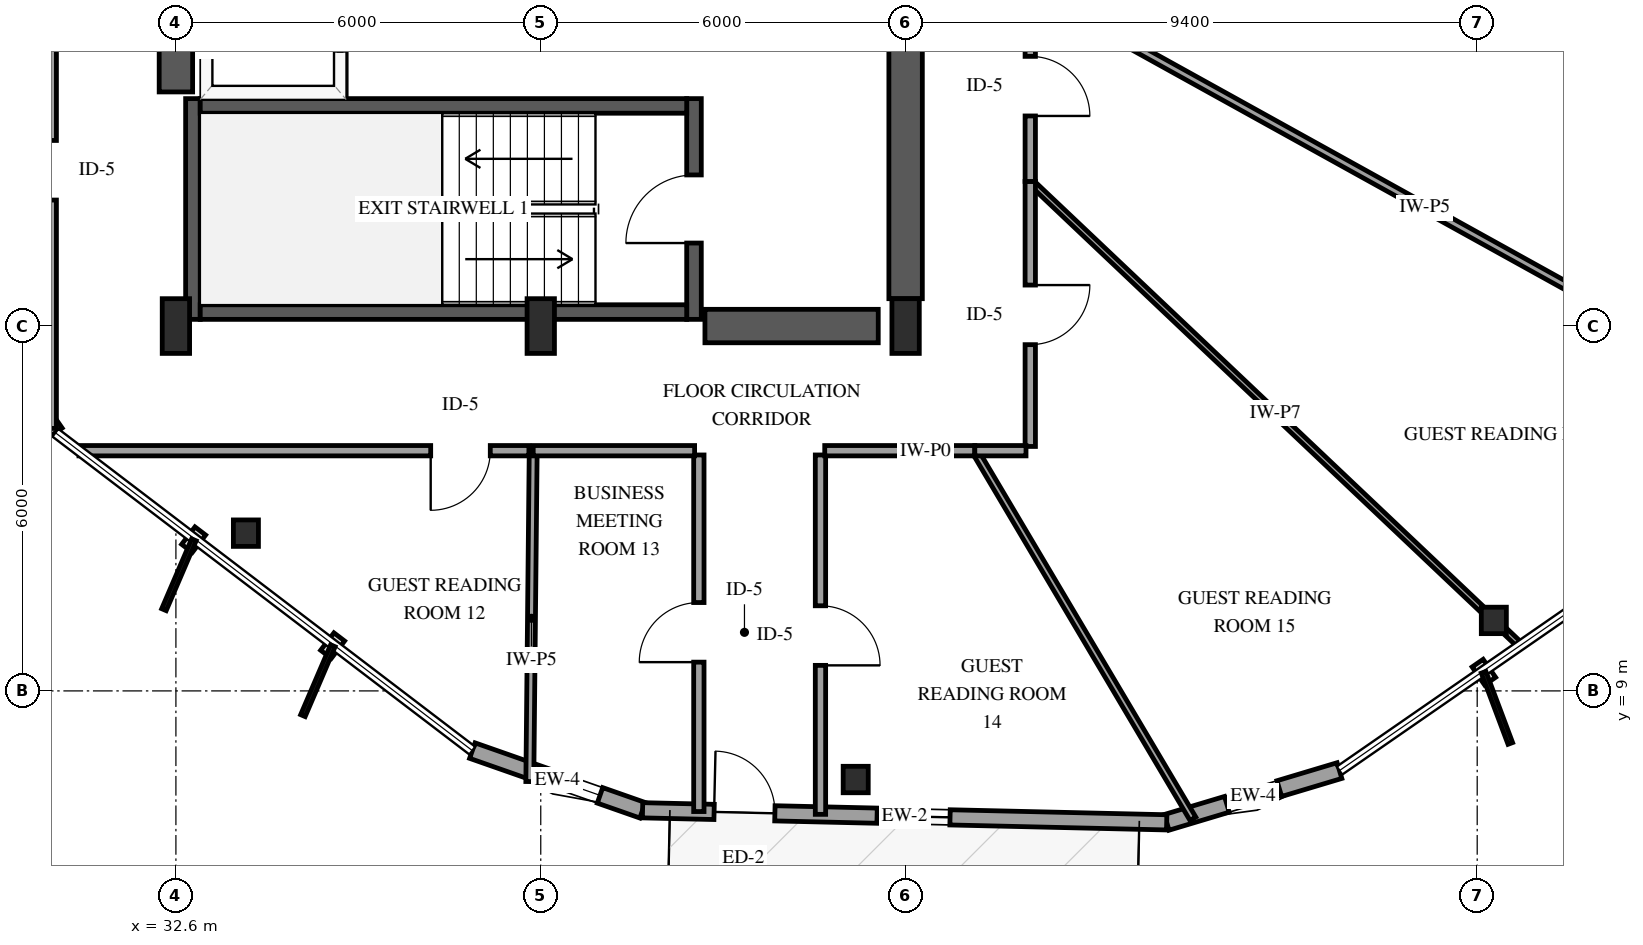
"""IFC4 building model, lengths in metres.
Left out: names, types, materials, properties, quantities, classifications, styles, units other than length and angle.
Written with IfcOpenShell. Run it as: python <this file> out.ifc"""

import sys

from ifc_helpers import new_model, si_unit, direction, frame, frame_2d, origin, origin_2d, place, context, subcontext, project, spatial, rectangle, i_section, extrude, element, fill, save


model = new_model("IFC4")
c1 = context("Model", 3, precision=1e-05, world=origin(), true_north=direction((0.0, 1.0)))
c2 = subcontext(c1, "Body", "Model", "MODEL_VIEW")
j1 = project(units=[si_unit("LENGTHUNIT", "METRE"), si_unit("PLANEANGLEUNIT", "RADIAN")], contexts=[c1])
p1 = place(None, origin())
s1 = spatial("IfcSite", under=j1, at=p1, CompositionType="ELEMENT")
p2 = place(p1, origin())
s2 = spatial("IfcBuilding", under=s1, at=p2, CompositionType="ELEMENT")
p3 = place(p2, frame((0.0, 0.0, 160.6)))
s3 = spatial("IfcBuildingStorey", under=s2, at=p3, CompositionType="ELEMENT", Elevation=160.6)
p4 = place(p3, frame((32.88, 15.11, 0.0), z_axis=(0.0, 0.0, 1.0), x_axis=(0.0, 1.0, 0.0)))
e1 = element("IfcWall", 1, at=p4, inside=s3, PredefinedType="SHEAR", context=c2, shape_type="SweptSolid", body=[
    extrude(rectangle(XDim=3.63, YDim=0.24, at=frame_2d((1.815, 0.0))), origin(), (0.0, 0.0, 1.0), 3.6),
])
p5 = place(p3, frame((41.12, 15.11, 0.0), z_axis=(0.0, 0.0, 1.0), x_axis=(0.0, 1.0, 0.0)))
e2 = element("IfcWall", 2, at=p5, inside=s3, PredefinedType="SHEAR", context=c2, shape_type="SweptSolid", body=[
    extrude(rectangle(XDim=3.63, YDim=0.24, at=frame_2d((1.815, 0.0))), origin(), (0.0, 0.0, 1.0), 3.6),
])
p6 = place(p5, frame((1.255, 0.0, 0.0)))
e3 = element("IfcOpeningElement", 3, at=p6, cuts=e2, PredefinedType="OPENING", context=c2, shape_type="SweptSolid", body=[
    extrude(rectangle(XDim=1.12, YDim=2.15, at=frame_2d((0.56, 1.075))), frame((0.0, 0.13, 0.0), z_axis=(0.0, -1.0, 0.0), x_axis=(1.0, 0.0, 0.0)), (0.0, 0.0, 1.0), 0.26),
])
for number, where, z_axis, x_axis in (
    (4, (33.0, 15.23, 0.0), (0.0, 0.0, 1.0), (1.0, 0.0, 0.0)),
    (5, (33.0, 18.62, 0.0), (0.0, 0.0, 1.0), (1.0, 0.0, 0.0)),
):
    element("IfcWall", number, at=place(p3, frame(where, z_axis=z_axis, x_axis=x_axis)), inside=s3, PredefinedType="SHEAR", context=c2, shape_type="SweptSolid", body=[
        extrude(rectangle(XDim=8.0, YDim=0.24, at=frame_2d((4.0, 0.0))), origin(), (0.0, 0.0, 1.0), 3.6),
    ])
p7 = place(p3, frame((32.6, 18.85, 0.0), z_axis=(0.0, 0.0, 1.0), x_axis=(0.0, 1.0, 0.0)))
e6 = element("IfcWall", 6, at=p7, inside=s3, PredefinedType="SHEAR", context=c2, shape_type="SweptSolid", body=[
    extrude(rectangle(XDim=12.3, YDim=0.55, at=frame_2d((6.15, 0.0))), origin(), (0.0, 0.0, 1.0), 3.6),
])
p8 = place(p3, frame((41.3, 15.0, 0.0), z_axis=(0.0, 0.0, 1.0), x_axis=(1.0, 0.0, 0.0)))
e7 = element("IfcWall", 7, at=p8, inside=s3, PredefinedType="SHEAR", context=c2, shape_type="SweptSolid", body=[
    extrude(rectangle(XDim=2.85, YDim=0.55, at=frame_2d((1.425, 0.0))), origin(), (0.0, 0.0, 1.0), 3.6),
])
p9 = place(p3, frame((44.6, 15.45, 0.0), z_axis=(0.0, 0.0, 1.0), x_axis=(0.0, 1.0, 0.0)))
e8 = element("IfcWall", 8, at=p9, inside=s3, PredefinedType="SHEAR", context=c2, shape_type="SweptSolid", body=[
    extrude(rectangle(XDim=6.35, YDim=0.55, at=frame_2d((3.175, 0.0))), origin(), (0.0, 0.0, 1.0), 3.6),
])
for number, where, z_axis, x_axis in (
    (9, (32.6, 15.0, 0.0), (0.0, 0.0, 1.0), (1.0, 0.0, 0.0)),
    (10, (38.6, 15.0, 0.0), (0.0, 0.0, 1.0), (1.0, 0.0, 0.0)),
    (11, (44.6, 15.0, 0.0), (0.0, 0.0, 1.0), (1.0, 0.0, 0.0)),
):
    element("IfcColumn", number, at=place(p3, frame(where, z_axis=z_axis, x_axis=x_axis)), inside=s3, PredefinedType="PILASTER", context=c2, shape_type="SweptSolid", body=[
        extrude(rectangle(XDim=0.45, YDim=0.9, at=origin_2d()), origin(), (0.0, 0.0, 1.0), 3.6),
    ])
for number, where, z_axis, x_axis in (
    (12, (33.751, 11.594, 0.0), (0.0, 0.0, 1.0), (1.0, 0.0, 0.0)),
    (13, (43.779, 7.542, 0.0), (0.0, 0.0, 1.0), (1.0, 0.0, 0.0)),
    (14, (54.274, 10.159, 0.0), (0.0, 0.0, 1.0), (1.0, 0.0, 0.0)),
):
    element("IfcColumn", number, at=place(p3, frame(where, z_axis=z_axis, x_axis=x_axis)), inside=s3, PredefinedType="COLUMN", context=c2, shape_type="SweptSolid", body=[
        extrude(i_section(OverallWidth=0.412, OverallDepth=0.435, WebThickness=0.036, FlangeThickness=0.057, FilletRadius=0.038, at=origin_2d()), origin(), (0.0, 0.0, 1.0), 3.6),
    ])
p10 = place(p3, frame((28.93, 15.685, 0.0), z_axis=(0.0, 0.0, 1.0), x_axis=(0.569013104062, -0.822328454698, 0.0)))
e15 = element("IfcWall", 15, at=p10, inside=s3, PredefinedType="SOLIDWALL", context=c2, shape_type="SweptSolid", body=[
    extrude(rectangle(XDim=2.967, YDim=0.27, at=frame_2d((1.483, 0.0))), origin(), (0.0, 0.0, 1.0), 2.679),
])
p11 = place(p3, frame((37.475, 8.018, 0.0), z_axis=(0.0, 0.0, 1.0), x_axis=(0.94371585025, -0.330757303755, 0.0)))
e16 = element("IfcWall", 16, at=p11, inside=s3, PredefinedType="SOLIDWALL", context=c2, shape_type="SweptSolid", body=[
    extrude(rectangle(XDim=2.967, YDim=0.27, at=frame_2d((1.483, 0.0))), origin(), (0.0, 0.0, 1.0), 2.679),
])
p12 = place(p11, frame((1.325, 0.0, 0.75)))
e17 = element("IfcOpeningElement", 17, at=p12, cuts=e16, PredefinedType="OPENING", context=c2, shape_type="SweptSolid", body=[
    extrude(rectangle(XDim=0.9, YDim=1.5, at=frame_2d((0.45, 0.75))), frame((0.0, 0.145, 0.0), z_axis=(0.0, -1.0, 0.0), x_axis=(1.0, 0.0, 0.0)), (0.0, 0.0, 1.0), 0.29),
])
p13 = place(p3, frame((48.893, 6.838, 0.0), z_axis=(0.0, 0.0, 1.0), x_axis=(0.957939463861, 0.286970353134, 0.0)))
e18 = element("IfcWall", 18, at=p13, inside=s3, PredefinedType="SOLIDWALL", context=c2, shape_type="SweptSolid", body=[
    extrude(rectangle(XDim=2.967, YDim=0.27, at=frame_2d((1.483, 0.0))), origin(), (0.0, 0.0, 1.0), 2.679),
])
p14 = place(p13, frame((1.033, 0.0, 0.75)))
e19 = element("IfcOpeningElement", 19, at=p14, cuts=e18, PredefinedType="OPENING", context=c2, shape_type="SweptSolid", body=[
    extrude(rectangle(XDim=0.9, YDim=1.5, at=frame_2d((0.45, 0.75))), frame((0.0, 0.145, 0.0), z_axis=(0.0, -1.0, 0.0), x_axis=(1.0, 0.0, 0.0)), (0.0, 0.0, 1.0), 0.29),
])
p15 = place(p3, frame((40.274, 7.037, 0.0), z_axis=(0.0, 0.0, 1.0), x_axis=(0.999734296137, -0.023050751106, 0.0)))
e20 = element("IfcWall", 20, at=p15, inside=s3, PredefinedType="SOLIDWALL", context=c2, shape_type="SweptSolid", body=[
    extrude(rectangle(XDim=8.621, YDim=0.25, at=frame_2d((4.311, 0.0))), origin(), (0.0, 0.0, 1.0), 2.679),
])
p16 = place(p15, frame((1.177, 0.0, 0.0)))
e21 = element("IfcOpeningElement", 21, at=p16, cuts=e20, PredefinedType="OPENING", context=c2, shape_type="SweptSolid", body=[
    extrude(rectangle(XDim=1.0, YDim=2.15, at=frame_2d((0.5, 1.075))), frame((0.0, 0.135, 0.0), z_axis=(0.0, -1.0, 0.0), x_axis=(1.0, 0.0, 0.0)), (0.0, 0.0, 1.0), 0.27),
])
p17 = place(p15, frame((3.858, 0.0, 0.72)))
e22 = element("IfcOpeningElement", 22, at=p17, cuts=e20, PredefinedType="OPENING", context=c2, shape_type="SweptSolid", body=[
    extrude(rectangle(XDim=1.2, YDim=1.6, at=frame_2d((0.6, 0.8))), frame((0.0, 0.135, 0.0), z_axis=(0.0, -1.0, 0.0), x_axis=(1.0, 0.0, 0.0)), (0.0, 0.0, 1.0), 0.27),
])
p18 = place(p3, frame((35.3, 18.79, 0.0), z_axis=(0.0, 0.0, 1.0), x_axis=(0.0, 1.0, 0.0)))
e23 = element("IfcWall", 23, at=p18, inside=s3, PredefinedType="SOLIDWALL", context=c2, shape_type="SweptSolid", body=[
    extrude(rectangle(XDim=2.55, YDim=0.2, at=frame_2d((1.275, 0.0))), origin(), (0.0, 0.0, 1.0), 3.3),
])
p19 = place(p18, frame((0.725, 0.0, 0.0)))
e24 = element("IfcOpeningElement", 24, at=p19, cuts=e23, PredefinedType="OPENING", context=c2, shape_type="SweptSolid", body=[
    extrude(rectangle(XDim=1.1, YDim=2.15, at=frame_2d((0.55, 1.075))), frame((0.0, 0.11, 0.0), z_axis=(0.0, -1.0, 0.0), x_axis=(1.0, 0.0, 0.0)), (0.0, 0.0, 1.0), 0.22),
])
p20 = place(p3, frame((46.65, 22.668, 0.0), z_axis=(0.0, 0.0, 1.0), x_axis=(0.960491510773, -0.278309284308, 0.0)))
e25 = element("IfcWall", 25, at=p20, inside=s3, PredefinedType="PARTITIONING", context=c2, shape_type="SweptSolid", body=[
    extrude(rectangle(XDim=15.763, YDim=0.1, at=frame_2d((7.881, 0.0))), origin(), (0.0, 0.0, 1.0), 3.3),
])
p21 = place(p3, frame((46.65, 20.542, 0.0), z_axis=(0.0, 0.0, 1.0), x_axis=(0.874793288303, -0.484496339244, 0.0)))
e26 = element("IfcWall", 26, at=p21, inside=s3, PredefinedType="PARTITIONING", context=c2, shape_type="SweptSolid", body=[
    extrude(rectangle(XDim=14.83, YDim=0.13, at=frame_2d((7.415, 0.0))), origin(), (0.0, 0.0, 1.0), 3.3),
])
p22 = place(p3, frame((46.65, 17.378, 0.0), z_axis=(0.0, 0.0, 1.0), x_axis=(0.726135317292, -0.687551816943, 0.0)))
e27 = element("IfcWall", 27, at=p22, inside=s3, PredefinedType="PARTITIONING", context=c2, shape_type="SweptSolid", body=[
    extrude(rectangle(XDim=11.099, YDim=0.1, at=frame_2d((5.549, 0.0))), origin(), (0.0, 0.0, 1.0), 2.595),
])
p23 = place(p3, frame((30.55, 13.317, 0.0), z_axis=(0.0, 0.0, 1.0), x_axis=(0.0, 1.0, 0.0)))
e28 = element("IfcWall", 28, at=p23, inside=s3, PredefinedType="PARTITIONING", context=c2, shape_type="SweptSolid", body=[
    extrude(rectangle(XDim=8.461, YDim=0.17, at=frame_2d((4.23, 0.0))), origin(), (0.0, 0.0, 1.0), 3.3),
])
p24 = place(p23, frame((3.755, 0.0, 0.0)))
e29 = element("IfcOpeningElement", 29, at=p24, cuts=e28, PredefinedType="OPENING", context=c2, shape_type="SweptSolid", body=[
    extrude(rectangle(XDim=0.98, YDim=2.15, at=frame_2d((0.49, 1.075))), frame((0.0, 0.095, 0.0), z_axis=(0.0, -1.0, 0.0), x_axis=(1.0, 0.0, 0.0)), (0.0, 0.0, 1.0), 0.19),
])
p25 = place(p3, frame((38.405, 12.95, 0.0), z_axis=(0.0, 0.0, 1.0), x_axis=(-1.0, 0.0, 0.0)))
e30 = element("IfcWall", 30, at=p25, inside=s3, PredefinedType="PARTITIONING", context=c2, shape_type="SweptSolid", body=[
    extrude(rectangle(XDim=7.399, YDim=0.17, at=frame_2d((3.699, 0.0))), origin(), (0.0, 0.0, 1.0), 3.3),
])
p26 = place(p25, frame((0.635, 0.0, 0.0)))
e31 = element("IfcOpeningElement", 31, at=p26, cuts=e30, PredefinedType="OPENING", context=c2, shape_type="SweptSolid", body=[
    extrude(rectangle(XDim=0.98, YDim=2.15, at=frame_2d((0.49, 1.075))), frame((0.0, 0.095, 0.0), z_axis=(0.0, -1.0, 0.0), x_axis=(1.0, 0.0, 0.0)), (0.0, 0.0, 1.0), 0.19),
])
p27 = place(p3, frame((45.738, 12.95, 0.0), z_axis=(0.0, 0.0, 1.0), x_axis=(0.50979858573, -0.860293788184, 0.0)))
e32 = element("IfcWall", 32, at=p27, inside=s3, PredefinedType="PARTITIONING", context=c2, shape_type="SweptSolid", body=[
    extrude(rectangle(XDim=7.036, YDim=0.11, at=frame_2d((3.518, 0.0))), origin(), (0.0, 0.0, 1.0), 2.678),
])
p28 = place(p3, frame((43.2, 12.88, 0.0), z_axis=(0.0, 0.0, 1.0), x_axis=(0.0, -1.0, 0.0)))
e33 = element("IfcWall", 33, at=p28, inside=s3, PredefinedType="PARTITIONING", context=c2, shape_type="SweptSolid", body=[
    extrude(rectangle(XDim=5.91, YDim=0.17, at=frame_2d((2.955, 0.0))), origin(), (0.0, 0.0, 1.0), 2.595),
])
p29 = place(p28, frame((2.48, 0.0, 0.0)))
e34 = element("IfcOpeningElement", 34, at=p29, cuts=e33, PredefinedType="OPENING", context=c2, shape_type="SweptSolid", body=[
    extrude(rectangle(XDim=0.98, YDim=2.15, at=frame_2d((0.49, 1.075))), frame((0.0, 0.095, 0.0), z_axis=(0.0, -1.0, 0.0), x_axis=(1.0, 0.0, 0.0)), (0.0, 0.0, 1.0), 0.19),
])
p30 = place(p3, frame((41.2, 7.016, 0.0), z_axis=(0.0, 0.0, 1.0), x_axis=(0.0, 1.0, 0.0)))
e35 = element("IfcWall", 35, at=p30, inside=s3, PredefinedType="PARTITIONING", context=c2, shape_type="SweptSolid", body=[
    extrude(rectangle(XDim=5.864, YDim=0.17, at=frame_2d((2.932, 0.0))), origin(), (0.0, 0.0, 1.0), 3.3),
])
p31 = place(p30, frame((2.457, 0.0, 0.0)))
e36 = element("IfcOpeningElement", 36, at=p31, cuts=e35, PredefinedType="OPENING", context=c2, shape_type="SweptSolid", body=[
    extrude(rectangle(XDim=0.98, YDim=2.15, at=frame_2d((0.49, 1.075))), frame((0.0, 0.095, 0.0), z_axis=(0.0, -1.0, 0.0), x_axis=(1.0, 0.0, 0.0)), (0.0, 0.0, 1.0), 0.19),
])
p32 = place(p3, frame((38.475, 12.879, 0.0), z_axis=(0.0, 0.0, 1.0), x_axis=(-0.010274520152, -0.999947215725, 0.0)))
e37 = element("IfcWall", 37, at=p32, inside=s3, PredefinedType="PARTITIONING", context=c2, shape_type="SweptSolid", body=[
    extrude(rectangle(XDim=5.37, YDim=0.13, at=frame_2d((2.685, 0.0))), origin(), (0.0, 0.0, 1.0), 2.678),
])
p33 = place(p3, frame((46.65, 17.378, 0.0), z_axis=(0.0, 0.0, 1.0), x_axis=(0.0, -1.0, 0.0)))
e38 = element("IfcWall", 38, at=p33, inside=s3, PredefinedType="PARTITIONING", context=c2, shape_type="SweptSolid", body=[
    extrude(rectangle(XDim=4.358, YDim=0.17, at=frame_2d((2.179, 0.0))), origin(), (0.0, 0.0, 1.0), 3.3),
])
p34 = place(p33, frame((1.704, 0.0, 0.0)))
e39 = element("IfcOpeningElement", 39, at=p34, cuts=e38, PredefinedType="OPENING", context=c2, shape_type="SweptSolid", body=[
    extrude(rectangle(XDim=0.98, YDim=2.15, at=frame_2d((0.49, 1.075))), frame((0.0, 0.095, 0.0), z_axis=(0.0, -1.0, 0.0), x_axis=(1.0, 0.0, 0.0)), (0.0, 0.0, 1.0), 0.19),
])
p35 = place(p3, frame((46.65, 20.542, 0.0), z_axis=(0.0, 0.0, 1.0), x_axis=(0.0, -1.0, 0.0)))
e40 = element("IfcWall", 40, at=p35, inside=s3, PredefinedType="PARTITIONING", context=c2, shape_type="SweptSolid", body=[
    extrude(rectangle(XDim=3.164, YDim=0.17, at=frame_2d((1.582, 0.0))), origin(), (0.0, 0.0, 1.0), 3.3),
])
p36 = place(p35, frame((1.107, 0.0, 0.0)))
e41 = element("IfcOpeningElement", 41, at=p36, cuts=e40, PredefinedType="OPENING", context=c2, shape_type="SweptSolid", body=[
    extrude(rectangle(XDim=0.98, YDim=2.15, at=frame_2d((0.49, 1.075))), frame((0.0, 0.095, 0.0), z_axis=(0.0, -1.0, 0.0), x_axis=(1.0, 0.0, 0.0)), (0.0, 0.0, 1.0), 0.19),
])
p37 = place(p3, frame((41.13, 12.95, 0.0), z_axis=(0.0, 0.0, 1.0), x_axis=(-1.0, 0.0, 0.0)))
e42 = element("IfcWall", 42, at=p37, inside=s3, PredefinedType="PARTITIONING", context=c2, shape_type="SweptSolid", body=[
    extrude(rectangle(XDim=2.654, YDim=0.17, at=frame_2d((1.327, 0.0))), origin(), (0.0, 0.0, 1.0), 3.3),
])
p38 = place(p3, frame((45.738, 12.95, 0.0), z_axis=(0.0, 0.0, 1.0), x_axis=(-1.0, 0.0, 0.0)))
e43 = element("IfcWall", 43, at=p38, inside=s3, PredefinedType="PARTITIONING", context=c2, shape_type="SweptSolid", body=[
    extrude(rectangle(XDim=2.468, YDim=0.17, at=frame_2d((1.234, 0.0))), origin(), (0.0, 0.0, 1.0), 3.3),
])
p39 = place(p3, frame((46.58, 12.95, 0.0), z_axis=(0.0, 0.0, 1.0), x_axis=(-1.0, 0.0, 0.0)))
e44 = element("IfcWall", 44, at=p39, inside=s3, PredefinedType="PARTITIONING", context=c2, shape_type="SweptSolid", body=[
    extrude(rectangle(XDim=0.842, YDim=0.17, at=frame_2d((0.421, 0.0))), origin(), (0.0, 0.0, 1.0), 3.3),
])
p40 = place(p12, origin())
e45 = element("IfcWindow", 45, at=p40, inside=s3, PartitioningType="SINGLE_PANEL", PredefinedType="WINDOW", context=c2, shape_type="SweptSolid", body=[
    extrude(rectangle(XDim=0.9, YDim=1.5, at=frame_2d((0.45, 0.75))), frame((0.0, 0.03, 0.0), z_axis=(0.0, -1.0, 0.0), x_axis=(1.0, 0.0, 0.0)), (0.0, 0.0, 1.0), 0.06),
])
fill(e17, e45)
p41 = place(p14, origin())
e46 = element("IfcWindow", 46, at=p41, inside=s3, PartitioningType="SINGLE_PANEL", PredefinedType="WINDOW", context=c2, shape_type="SweptSolid", body=[
    extrude(rectangle(XDim=0.9, YDim=1.5, at=frame_2d((0.45, 0.75))), frame((0.0, 0.03, 0.0), z_axis=(0.0, -1.0, 0.0), x_axis=(1.0, 0.0, 0.0)), (0.0, 0.0, 1.0), 0.06),
])
fill(e19, e46)
p42 = place(p16, origin())
e47 = element("IfcDoor", 47, at=p42, inside=s3, OperationType="SINGLE_SWING_LEFT", PredefinedType="DOOR", context=c2, shape_type="SweptSolid", body=[
    extrude(rectangle(XDim=1.0, YDim=2.15, at=frame_2d((0.5, 1.075))), frame((0.0, 0.025, 0.0), z_axis=(0.0, -1.0, 0.0), x_axis=(1.0, 0.0, 0.0)), (0.0, 0.0, 1.0), 0.05),
])
fill(e21, e47)
p43 = place(p17, origin())
e48 = element("IfcWindow", 48, at=p43, inside=s3, PartitioningType="SINGLE_PANEL", PredefinedType="WINDOW", context=c2, shape_type="SweptSolid", body=[
    extrude(rectangle(XDim=1.2, YDim=1.6, at=frame_2d((0.6, 0.8))), frame((0.0, 0.03, 0.0), z_axis=(0.0, -1.0, 0.0), x_axis=(1.0, 0.0, 0.0)), (0.0, 0.0, 1.0), 0.06),
])
fill(e22, e48)
p44 = place(p6, origin())
e49 = element("IfcDoor", 49, at=p44, inside=s3, OperationType="SINGLE_SWING_LEFT", PredefinedType="DOOR", context=c2, shape_type="SweptSolid", body=[
    extrude(rectangle(XDim=1.12, YDim=2.15, at=frame_2d((0.56, 1.075))), frame((0.0, 0.025, 0.0), z_axis=(0.0, -1.0, 0.0), x_axis=(1.0, 0.0, 0.0)), (0.0, 0.0, 1.0), 0.05),
])
fill(e3, e49)
p45 = place(p26, origin())
e50 = element("IfcDoor", 50, at=p45, inside=s3, OperationType="SINGLE_SWING_RIGHT", PredefinedType="DOOR", context=c2, shape_type="SweptSolid", body=[
    extrude(rectangle(XDim=0.98, YDim=2.15, at=frame_2d((0.49, 1.075))), frame((0.0, 0.025, 0.0), z_axis=(0.0, -1.0, 0.0), x_axis=(1.0, 0.0, 0.0)), (0.0, 0.0, 1.0), 0.05),
])
fill(e31, e50)
p46 = place(p29, origin())
e51 = element("IfcDoor", 51, at=p46, inside=s3, OperationType="SINGLE_SWING_RIGHT", PredefinedType="DOOR", context=c2, shape_type="SweptSolid", body=[
    extrude(rectangle(XDim=0.98, YDim=2.15, at=frame_2d((0.49, 1.075))), frame((0.0, 0.025, 0.0), z_axis=(0.0, -1.0, 0.0), x_axis=(1.0, 0.0, 0.0)), (0.0, 0.0, 1.0), 0.05),
])
fill(e34, e51)
p47 = place(p31, origin())
e52 = element("IfcDoor", 52, at=p47, inside=s3, OperationType="SINGLE_SWING_LEFT", PredefinedType="DOOR", context=c2, shape_type="SweptSolid", body=[
    extrude(rectangle(XDim=0.98, YDim=2.15, at=frame_2d((0.49, 1.075))), frame((0.0, 0.025, 0.0), z_axis=(0.0, -1.0, 0.0), x_axis=(1.0, 0.0, 0.0)), (0.0, 0.0, 1.0), 0.05),
])
fill(e36, e52)
p48 = place(p34, origin())
e53 = element("IfcDoor", 53, at=p48, inside=s3, OperationType="SINGLE_SWING_LEFT", PredefinedType="DOOR", context=c2, shape_type="SweptSolid", body=[
    extrude(rectangle(XDim=0.98, YDim=2.15, at=frame_2d((0.49, 1.075))), frame((0.0, 0.025, 0.0), z_axis=(0.0, -1.0, 0.0), x_axis=(1.0, 0.0, 0.0)), (0.0, 0.0, 1.0), 0.05),
])
fill(e39, e53)
p49 = place(p36, origin())
e54 = element("IfcDoor", 54, at=p49, inside=s3, OperationType="SINGLE_SWING_RIGHT", PredefinedType="DOOR", context=c2, shape_type="SweptSolid", body=[
    extrude(rectangle(XDim=0.98, YDim=2.15, at=frame_2d((0.49, 1.075))), frame((0.0, 0.025, 0.0), z_axis=(0.0, -1.0, 0.0), x_axis=(1.0, 0.0, 0.0)), (0.0, 0.0, 1.0), 0.05),
])
fill(e41, e54)
save(model, sys.argv[1])
